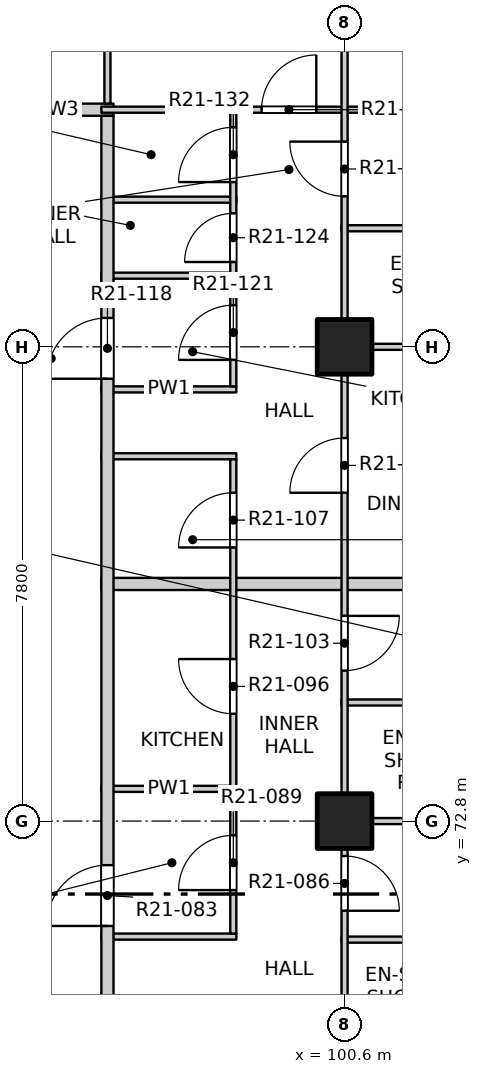
"""IFC4 building model, lengths in metres.
Left out: names, types, materials, properties, quantities, classifications, styles, units other than length and angle.
Written with IfcOpenShell. Run it as: python <this file> out.ifc"""

import sys

from ifc_helpers import new_model, si_unit, direction, frame, frame_2d, origin, origin_2d, place, context, subcontext, project, spatial, rectangle, extrude, element, fill, save


model = new_model("IFC4")
c1 = context("Model", 3, precision=1e-05, world=origin(), true_north=direction((0.0, 1.0)))
c2 = subcontext(c1, "Body", "Model", "MODEL_VIEW")
j1 = project(units=[si_unit("LENGTHUNIT", "METRE"), si_unit("PLANEANGLEUNIT", "RADIAN")], contexts=[c1])
p1 = place(None, origin())
s1 = spatial("IfcSite", under=j1, at=p1, CompositionType="ELEMENT")
p2 = place(p1, origin())
s2 = spatial("IfcBuilding", under=s1, at=p2, CompositionType="ELEMENT")
p3 = place(p2, frame((0.0, 0.0, 221.1)))
s3 = spatial("IfcBuildingStorey", under=s2, at=p3, CompositionType="ELEMENT", Elevation=221.1)
for number, where, z_axis, x_axis in (
    (1, (100.6, 72.8, -0.25), (0.0, 0.0, 1.0), (1.0, 0.0, 0.0)),
    (2, (100.6, 80.6, -0.25), (0.0, 0.0, 1.0), (1.0, 0.0, 0.0)),
):
    element("IfcColumn", number, at=place(p3, frame(where, z_axis=z_axis, x_axis=x_axis)), inside=s3, PredefinedType="COLUMN", context=c2, shape_type="SweptSolid", body=[
        extrude(rectangle(XDim=0.9, YDim=0.9, at=origin_2d()), origin(), (0.0, 0.0, 1.0), 3.4),
    ])
p4 = place(p3, frame((100.55, 70.85, 0.0), z_axis=(0.0, 0.0, 1.0), x_axis=(1.0, 0.0, 0.0)))
e3 = element("IfcWall", 3, at=p4, inside=s3, PredefinedType="PARTITIONING", context=c2, shape_type="SweptSolid", body=[
    extrude(rectangle(XDim=3.4, YDim=0.1, at=frame_2d((1.7, 0.0))), origin(), (0.0, 0.0, 1.0), 3.15),
])
p5 = place(p3, frame((96.6, 70.9, 0.0), z_axis=(0.0, 0.0, 1.0), x_axis=(1.0, 0.0, 0.0)))
e4 = element("IfcWall", 4, at=p5, inside=s3, PredefinedType="PARTITIONING", context=c2, shape_type="SweptSolid", body=[
    extrude(rectangle(XDim=2.22, YDim=0.1, at=frame_2d((1.11, 0.0))), origin(), (0.0, 0.0, 1.0), 3.15),
])
p6 = place(p3, frame((100.55, 72.8, 0.0), z_axis=(0.0, 0.0, 1.0), x_axis=(1.0, 0.0, 0.0)))
e5 = element("IfcWall", 5, at=p6, inside=s3, PredefinedType="PARTITIONING", context=c2, shape_type="SweptSolid", body=[
    extrude(rectangle(XDim=7.55, YDim=0.1, at=frame_2d((3.775, 0.0))), origin(), (0.0, 0.0, 1.0), 3.15),
])
p7 = place(p3, frame((96.6, 73.33, 0.0), z_axis=(0.0, 0.0, 1.0), x_axis=(1.0, 0.0, 0.0)))
e6 = element("IfcWall", 6, at=p7, inside=s3, PredefinedType="PARTITIONING", context=c2, shape_type="SweptSolid", body=[
    extrude(rectangle(XDim=2.22, YDim=0.1, at=frame_2d((1.11, 0.0))), origin(), (0.0, 0.0, 1.0), 3.15),
])
p8 = place(p3, frame((100.55, 74.75, 0.0), z_axis=(0.0, 0.0, 1.0), x_axis=(1.0, 0.0, 0.0)))
e7 = element("IfcWall", 7, at=p8, inside=s3, PredefinedType="PARTITIONING", context=c2, shape_type="SweptSolid", body=[
    extrude(rectangle(XDim=3.4, YDim=0.1, at=frame_2d((1.7, 0.0))), origin(), (0.0, 0.0, 1.0), 3.15),
])
p9 = place(p3, frame((96.6, 76.7, 0.0), z_axis=(0.0, 0.0, 1.0), x_axis=(1.0, 0.0, 0.0)))
e8 = element("IfcWall", 8, at=p9, inside=s3, PredefinedType="PARTITIONING", context=c2, shape_type="SweptSolid", body=[
    extrude(rectangle(XDim=11.5, YDim=0.2, at=frame_2d((5.75, 0.0))), origin(), (0.0, 0.0, 1.0), 2.55),
])
for number, where, z_axis, x_axis in (
    (9, (96.6, 78.8, 0.0), (0.0, 0.0, 1.0), (1.0, 0.0, 0.0)),
    (10, (96.6, 79.9, 0.0), (0.0, 0.0, 1.0), (1.0, 0.0, 0.0)),
):
    element("IfcWall", number, at=place(p3, frame(where, z_axis=z_axis, x_axis=x_axis)), inside=s3, PredefinedType="PARTITIONING", context=c2, shape_type="SweptSolid", body=[
        extrude(rectangle(XDim=2.22, YDim=0.1, at=frame_2d((1.11, 0.0))), origin(), (0.0, 0.0, 1.0), 3.15),
    ])
p10 = place(p3, frame((100.55, 80.6, 0.0), z_axis=(0.0, 0.0, 1.0), x_axis=(1.0, 0.0, 0.0)))
e11 = element("IfcWall", 11, at=p10, inside=s3, PredefinedType="PARTITIONING", context=c2, shape_type="SweptSolid", body=[
    extrude(rectangle(XDim=7.55, YDim=0.1, at=frame_2d((3.775, 0.0))), origin(), (0.0, 0.0, 1.0), 3.15),
])
p11 = place(p3, frame((96.6, 81.77, 0.0), z_axis=(0.0, 0.0, 1.0), x_axis=(1.0, 0.0, 0.0)))
e12 = element("IfcWall", 12, at=p11, inside=s3, PredefinedType="PARTITIONING", context=c2, shape_type="SweptSolid", body=[
    extrude(rectangle(XDim=2.22, YDim=0.1, at=frame_2d((1.11, 0.0))), origin(), (0.0, 0.0, 1.0), 3.15),
])
p12 = place(p3, frame((100.55, 82.55, 0.0), z_axis=(0.0, 0.0, 1.0), x_axis=(1.0, 0.0, 0.0)))
e13 = element("IfcWall", 13, at=p12, inside=s3, PredefinedType="PARTITIONING", context=c2, shape_type="SweptSolid", body=[
    extrude(rectangle(XDim=3.7, YDim=0.1, at=frame_2d((1.85, 0.0))), origin(), (0.0, 0.0, 1.0), 3.15),
])
p13 = place(p3, frame((96.6, 83.02, 0.0), z_axis=(0.0, 0.0, 1.0), x_axis=(1.0, 0.0, 0.0)))
e14 = element("IfcWall", 14, at=p13, inside=s3, PredefinedType="PARTITIONING", context=c2, shape_type="SweptSolid", body=[
    extrude(rectangle(XDim=2.22, YDim=0.1, at=frame_2d((1.11, 0.0))), origin(), (0.0, 0.0, 1.0), 3.15),
])
p14 = place(p3, frame((94.95, 84.5, 0.0), z_axis=(0.0, 0.0, 1.0), x_axis=(1.0, 0.0, 0.0)))
e15 = element("IfcWall", 15, at=p14, inside=s3, PredefinedType="PARTITIONING", context=c2, shape_type="SweptSolid", body=[
    extrude(rectangle(XDim=1.85, YDim=0.2, at=frame_2d((0.925, 0.0))), origin(), (0.0, 0.0, 1.0), 3.15),
])
p15 = place(p3, frame((96.6, 84.5, 0.0), z_axis=(0.0, 0.0, 1.0), x_axis=(1.0, 0.0, 0.0)))
e16 = element("IfcWall", 16, at=p15, inside=s3, PredefinedType="PARTITIONING", context=c2, shape_type="SweptSolid", body=[
    extrude(rectangle(XDim=11.5, YDim=0.1, at=frame_2d((5.75, 0.0))), origin(), (0.0, 0.0, 1.0), 3.15),
])
p16 = place(p15, frame((2.635, 0.0, 0.0)))
e17 = element("IfcOpeningElement", 17, at=p16, cuts=e16, PredefinedType="OPENING", context=c2, shape_type="SweptSolid", body=[
    extrude(rectangle(XDim=0.9, YDim=2.1, at=frame_2d((0.45, 1.05))), frame((0.0, 0.06, 0.0), z_axis=(0.0, -1.0, 0.0), x_axis=(1.0, 0.0, 0.0)), (0.0, 0.0, 1.0), 0.12),
])
p17 = place(p3, frame((96.7, 49.5, 0.0), z_axis=(0.0, 0.0, 1.0), x_axis=(0.0, 1.0, 0.0)))
e18 = element("IfcWall", 18, at=p17, inside=s3, PredefinedType="PARTITIONING", context=c2, shape_type="SweptSolid", body=[
    extrude(rectangle(XDim=34.9, YDim=0.2, at=frame_2d((17.45, 0.0))), origin(), (0.0, 0.0, 1.0), 3.15),
])
p18 = place(p17, frame((3.275, 0.0, 0.0)))
e19 = element("IfcOpeningElement", 19, at=p18, cuts=e18, PredefinedType="OPENING", context=c2, shape_type="SweptSolid", body=[
    extrude(rectangle(XDim=1.0, YDim=2.1, at=frame_2d((0.5, 1.05))), frame((0.0, 0.11, 0.0), z_axis=(0.0, -1.0, 0.0), x_axis=(1.0, 0.0, 0.0)), (0.0, 0.0, 1.0), 0.22),
])
p19 = place(p17, frame((10.825, 0.0, 0.0)))
e20 = element("IfcOpeningElement", 20, at=p19, cuts=e18, PredefinedType="OPENING", context=c2, shape_type="SweptSolid", body=[
    extrude(rectangle(XDim=1.0, YDim=2.1, at=frame_2d((0.5, 1.05))), frame((0.0, 0.11, 0.0), z_axis=(0.0, -1.0, 0.0), x_axis=(1.0, 0.0, 0.0)), (0.0, 0.0, 1.0), 0.22),
])
p20 = place(p17, frame((21.575, 0.0, 0.0)))
e21 = element("IfcOpeningElement", 21, at=p20, cuts=e18, PredefinedType="OPENING", context=c2, shape_type="SweptSolid", body=[
    extrude(rectangle(XDim=1.0, YDim=2.1, at=frame_2d((0.5, 1.05))), frame((0.0, 0.11, 0.0), z_axis=(0.0, -1.0, 0.0), x_axis=(1.0, 0.0, 0.0)), (0.0, 0.0, 1.0), 0.22),
])
p21 = place(p17, frame((30.575, 0.0, 0.0)))
e22 = element("IfcOpeningElement", 22, at=p21, cuts=e18, PredefinedType="OPENING", context=c2, shape_type="SweptSolid", body=[
    extrude(rectangle(XDim=1.0, YDim=2.1, at=frame_2d((0.5, 1.05))), frame((0.0, 0.11, 0.0), z_axis=(0.0, -1.0, 0.0), x_axis=(1.0, 0.0, 0.0)), (0.0, 0.0, 1.0), 0.22),
])
p22 = place(p3, frame((96.7, 84.6, 0.0), z_axis=(0.0, 0.0, 1.0), x_axis=(0.0, 1.0, 0.0)))
e23 = element("IfcWall", 23, at=p22, inside=s3, PredefinedType="PARTITIONING", context=c2, shape_type="SweptSolid", body=[
    extrude(rectangle(XDim=3.5, YDim=0.1, at=frame_2d((1.75, 0.0))), origin(), (0.0, 0.0, 1.0), 3.15),
])
p23 = place(p22, frame((1.4, 0.0, 0.0)))
e24 = element("IfcOpeningElement", 24, at=p23, cuts=e23, PredefinedType="OPENING", context=c2, shape_type="SweptSolid", body=[
    extrude(rectangle(XDim=0.9, YDim=2.1, at=frame_2d((0.45, 1.05))), frame((0.0, 0.06, 0.0), z_axis=(0.0, -1.0, 0.0), x_axis=(1.0, 0.0, 0.0)), (0.0, 0.0, 1.0), 0.12),
])
p24 = place(p3, frame((98.77, 70.95, 0.0), z_axis=(0.0, 0.0, 1.0), x_axis=(0.0, 1.0, 0.0)))
e25 = element("IfcWall", 25, at=p24, inside=s3, PredefinedType="PARTITIONING", context=c2, shape_type="SweptSolid", body=[
    extrude(rectangle(XDim=7.8, YDim=0.1, at=frame_2d((3.9, 0.0))), origin(), (0.0, 0.0, 1.0), 3.15),
])
p25 = place(p24, frame((0.715, 0.0, 0.0)))
e26 = element("IfcOpeningElement", 26, at=p25, cuts=e25, PredefinedType="OPENING", context=c2, shape_type="SweptSolid", body=[
    extrude(rectangle(XDim=0.9, YDim=2.1, at=frame_2d((0.45, 1.05))), frame((0.0, 0.06, 0.0), z_axis=(0.0, -1.0, 0.0), x_axis=(1.0, 0.0, 0.0)), (0.0, 0.0, 1.0), 0.12),
])
p26 = place(p24, frame((3.615, 0.0, 0.0)))
e27 = element("IfcOpeningElement", 27, at=p26, cuts=e25, PredefinedType="OPENING", context=c2, shape_type="SweptSolid", body=[
    extrude(rectangle(XDim=0.9, YDim=2.1, at=frame_2d((0.45, 1.05))), frame((0.0, 0.06, 0.0), z_axis=(0.0, -1.0, 0.0), x_axis=(1.0, 0.0, 0.0)), (0.0, 0.0, 1.0), 0.12),
])
p27 = place(p24, frame((6.35, 0.0, 0.0)))
e28 = element("IfcOpeningElement", 28, at=p27, cuts=e25, PredefinedType="OPENING", context=c2, shape_type="SweptSolid", body=[
    extrude(rectangle(XDim=0.9, YDim=2.1, at=frame_2d((0.45, 1.05))), frame((0.0, 0.06, 0.0), z_axis=(0.0, -1.0, 0.0), x_axis=(1.0, 0.0, 0.0)), (0.0, 0.0, 1.0), 0.12),
])
p28 = place(p3, frame((98.77, 79.95, 0.0), z_axis=(0.0, 0.0, 1.0), x_axis=(0.0, 1.0, 0.0)))
e29 = element("IfcWall", 29, at=p28, inside=s3, PredefinedType="PARTITIONING", context=c2, shape_type="SweptSolid", body=[
    extrude(rectangle(XDim=4.5, YDim=0.1, at=frame_2d((2.25, 0.0))), origin(), (0.0, 0.0, 1.0), 3.15),
])
p29 = place(p28, frame((0.435, 0.0, 0.0)))
e30 = element("IfcOpeningElement", 30, at=p29, cuts=e29, PredefinedType="OPENING", context=c2, shape_type="SweptSolid", body=[
    extrude(rectangle(XDim=0.9, YDim=2.1, at=frame_2d((0.45, 1.05))), frame((0.0, 0.06, 0.0), z_axis=(0.0, -1.0, 0.0), x_axis=(1.0, 0.0, 0.0)), (0.0, 0.0, 1.0), 0.12),
])
p30 = place(p28, frame((2.045, 0.0, 0.0)))
e31 = element("IfcOpeningElement", 31, at=p30, cuts=e29, PredefinedType="OPENING", context=c2, shape_type="SweptSolid", body=[
    extrude(rectangle(XDim=0.8, YDim=2.1, at=frame_2d((0.4, 1.05))), frame((0.0, 0.06, 0.0), z_axis=(0.0, -1.0, 0.0), x_axis=(1.0, 0.0, 0.0)), (0.0, 0.0, 1.0), 0.12),
])
p31 = place(p28, frame((3.36, 0.0, 0.0)))
e32 = element("IfcOpeningElement", 32, at=p31, cuts=e29, PredefinedType="OPENING", context=c2, shape_type="SweptSolid", body=[
    extrude(rectangle(XDim=0.9, YDim=2.1, at=frame_2d((0.45, 1.05))), frame((0.0, 0.06, 0.0), z_axis=(0.0, -1.0, 0.0), x_axis=(1.0, 0.0, 0.0)), (0.0, 0.0, 1.0), 0.12),
])
p32 = place(p3, frame((100.6, 41.9, 0.0), z_axis=(0.0, 0.0, 1.0), x_axis=(0.0, 1.0, 0.0)))
e33 = element("IfcWall", 33, at=p32, inside=s3, PredefinedType="PARTITIONING", context=c2, shape_type="SweptSolid", body=[
    extrude(rectangle(XDim=46.2, YDim=0.1, at=frame_2d((23.1, 0.0))), origin(), (0.0, 0.0, 1.0), 3.15),
])
p33 = place(p32, frame((1.2, 0.0, 0.0)))
e34 = element("IfcOpeningElement", 34, at=p33, cuts=e33, PredefinedType="OPENING", context=c2, shape_type="SweptSolid", body=[
    extrude(rectangle(XDim=0.9, YDim=2.1, at=frame_2d((0.45, 1.05))), frame((0.0, 0.06, 0.0), z_axis=(0.0, -1.0, 0.0), x_axis=(1.0, 0.0, 0.0)), (0.0, 0.0, 1.0), 0.12),
])
p34 = place(p32, frame((6.025, 0.0, 0.0)))
e35 = element("IfcOpeningElement", 35, at=p34, cuts=e33, PredefinedType="OPENING", context=c2, shape_type="SweptSolid", body=[
    extrude(rectangle(XDim=0.9, YDim=2.1, at=frame_2d((0.45, 1.05))), frame((0.0, 0.06, 0.0), z_axis=(0.0, -1.0, 0.0), x_axis=(1.0, 0.0, 0.0)), (0.0, 0.0, 1.0), 0.12),
])
p35 = place(p32, frame((9.0, 0.0, 0.0)))
e36 = element("IfcOpeningElement", 36, at=p35, cuts=e33, PredefinedType="OPENING", context=c2, shape_type="SweptSolid", body=[
    extrude(rectangle(XDim=0.9, YDim=2.1, at=frame_2d((0.45, 1.05))), frame((0.0, 0.06, 0.0), z_axis=(0.0, -1.0, 0.0), x_axis=(1.0, 0.0, 0.0)), (0.0, 0.0, 1.0), 0.12),
])
p36 = place(p32, frame((13.85, 0.0, 0.0)))
e37 = element("IfcOpeningElement", 37, at=p36, cuts=e33, PredefinedType="OPENING", context=c2, shape_type="SweptSolid", body=[
    extrude(rectangle(XDim=0.9, YDim=2.1, at=frame_2d((0.45, 1.05))), frame((0.0, 0.06, 0.0), z_axis=(0.0, -1.0, 0.0), x_axis=(1.0, 0.0, 0.0)), (0.0, 0.0, 1.0), 0.12),
])
p37 = place(p32, frame((16.8, 0.0, 0.0)))
e38 = element("IfcOpeningElement", 38, at=p37, cuts=e33, PredefinedType="OPENING", context=c2, shape_type="SweptSolid", body=[
    extrude(rectangle(XDim=0.9, YDim=2.1, at=frame_2d((0.45, 1.05))), frame((0.0, 0.06, 0.0), z_axis=(0.0, -1.0, 0.0), x_axis=(1.0, 0.0, 0.0)), (0.0, 0.0, 1.0), 0.12),
])
p38 = place(p32, frame((21.625, 0.0, 0.0)))
e39 = element("IfcOpeningElement", 39, at=p38, cuts=e33, PredefinedType="OPENING", context=c2, shape_type="SweptSolid", body=[
    extrude(rectangle(XDim=0.9, YDim=2.1, at=frame_2d((0.45, 1.05))), frame((0.0, 0.06, 0.0), z_axis=(0.0, -1.0, 0.0), x_axis=(1.0, 0.0, 0.0)), (0.0, 0.0, 1.0), 0.12),
])
p39 = place(p32, frame((24.6, 0.0, 0.0)))
e40 = element("IfcOpeningElement", 40, at=p39, cuts=e33, PredefinedType="OPENING", context=c2, shape_type="SweptSolid", body=[
    extrude(rectangle(XDim=0.9, YDim=2.1, at=frame_2d((0.45, 1.05))), frame((0.0, 0.06, 0.0), z_axis=(0.0, -1.0, 0.0), x_axis=(1.0, 0.0, 0.0)), (0.0, 0.0, 1.0), 0.12),
])
p40 = place(p32, frame((29.425, 0.0, 0.0)))
e41 = element("IfcOpeningElement", 41, at=p40, cuts=e33, PredefinedType="OPENING", context=c2, shape_type="SweptSolid", body=[
    extrude(rectangle(XDim=0.9, YDim=2.1, at=frame_2d((0.45, 1.05))), frame((0.0, 0.06, 0.0), z_axis=(0.0, -1.0, 0.0), x_axis=(1.0, 0.0, 0.0)), (0.0, 0.0, 1.0), 0.12),
])
p41 = place(p32, frame((33.375, 0.0, 0.0)))
e42 = element("IfcOpeningElement", 42, at=p41, cuts=e33, PredefinedType="OPENING", context=c2, shape_type="SweptSolid", body=[
    extrude(rectangle(XDim=0.9, YDim=2.1, at=frame_2d((0.45, 1.05))), frame((0.0, 0.06, 0.0), z_axis=(0.0, -1.0, 0.0), x_axis=(1.0, 0.0, 0.0)), (0.0, 0.0, 1.0), 0.12),
])
p42 = place(p32, frame((36.3, 0.0, 0.0)))
e43 = element("IfcOpeningElement", 43, at=p42, cuts=e33, PredefinedType="OPENING", context=c2, shape_type="SweptSolid", body=[
    extrude(rectangle(XDim=0.9, YDim=2.1, at=frame_2d((0.45, 1.05))), frame((0.0, 0.06, 0.0), z_axis=(0.0, -1.0, 0.0), x_axis=(1.0, 0.0, 0.0)), (0.0, 0.0, 1.0), 0.12),
])
p43 = place(p32, frame((41.175, 0.0, 0.0)))
e44 = element("IfcOpeningElement", 44, at=p43, cuts=e33, PredefinedType="OPENING", context=c2, shape_type="SweptSolid", body=[
    extrude(rectangle(XDim=0.9, YDim=2.1, at=frame_2d((0.45, 1.05))), frame((0.0, 0.06, 0.0), z_axis=(0.0, -1.0, 0.0), x_axis=(1.0, 0.0, 0.0)), (0.0, 0.0, 1.0), 0.12),
])
p44 = place(p32, frame((44.1, 0.0, 0.0)))
e45 = element("IfcOpeningElement", 45, at=p44, cuts=e33, PredefinedType="OPENING", context=c2, shape_type="SweptSolid", body=[
    extrude(rectangle(XDim=0.9, YDim=2.1, at=frame_2d((0.45, 1.05))), frame((0.0, 0.06, 0.0), z_axis=(0.0, -1.0, 0.0), x_axis=(1.0, 0.0, 0.0)), (0.0, 0.0, 1.0), 0.12),
])
p45 = place(p20, origin())
e46 = element("IfcDoor", 46, at=p45, inside=s3, OperationType="SINGLE_SWING_LEFT", PredefinedType="DOOR", context=c2, shape_type="SweptSolid", body=[
    extrude(rectangle(XDim=1.0, YDim=2.1, at=frame_2d((0.5, 1.05))), frame((0.0, 0.025, 0.0), z_axis=(0.0, -1.0, 0.0), x_axis=(1.0, 0.0, 0.0)), (0.0, 0.0, 1.0), 0.05),
])
fill(e21, e46)
p46 = place(p40, origin())
e47 = element("IfcDoor", 47, at=p46, inside=s3, OperationType="SINGLE_SWING_RIGHT", PredefinedType="DOOR", context=c2, shape_type="SweptSolid", body=[
    extrude(rectangle(XDim=0.9, YDim=2.1, at=frame_2d((0.45, 1.05))), frame((0.0, 0.025, 0.0), z_axis=(0.0, -1.0, 0.0), x_axis=(1.0, 0.0, 0.0)), (0.0, 0.0, 1.0), 0.05),
])
fill(e41, e47)
p47 = place(p25, origin())
e48 = element("IfcDoor", 48, at=p47, inside=s3, OperationType="SINGLE_SWING_LEFT", PredefinedType="DOOR", context=c2, shape_type="SweptSolid", body=[
    extrude(rectangle(XDim=0.9, YDim=2.1, at=frame_2d((0.45, 1.05))), frame((0.0, 0.025, 0.0), z_axis=(0.0, -1.0, 0.0), x_axis=(1.0, 0.0, 0.0)), (0.0, 0.0, 1.0), 0.05),
])
fill(e26, e48)
p48 = place(p26, origin())
e49 = element("IfcDoor", 49, at=p48, inside=s3, OperationType="SINGLE_SWING_RIGHT", PredefinedType="DOOR", context=c2, shape_type="SweptSolid", body=[
    extrude(rectangle(XDim=0.9, YDim=2.1, at=frame_2d((0.45, 1.05))), frame((0.0, 0.025, 0.0), z_axis=(0.0, -1.0, 0.0), x_axis=(1.0, 0.0, 0.0)), (0.0, 0.0, 1.0), 0.05),
])
fill(e27, e49)
p49 = place(p41, origin())
e50 = element("IfcDoor", 50, at=p49, inside=s3, OperationType="SINGLE_SWING_LEFT", PredefinedType="DOOR", context=c2, shape_type="SweptSolid", body=[
    extrude(rectangle(XDim=0.9, YDim=2.1, at=frame_2d((0.45, 1.05))), frame((0.0, 0.025, 0.0), z_axis=(0.0, -1.0, 0.0), x_axis=(1.0, 0.0, 0.0)), (0.0, 0.0, 1.0), 0.05),
])
fill(e42, e50)
p50 = place(p27, origin())
e51 = element("IfcDoor", 51, at=p50, inside=s3, OperationType="SINGLE_SWING_LEFT", PredefinedType="DOOR", context=c2, shape_type="SweptSolid", body=[
    extrude(rectangle(XDim=0.9, YDim=2.1, at=frame_2d((0.45, 1.05))), frame((0.0, 0.025, 0.0), z_axis=(0.0, -1.0, 0.0), x_axis=(1.0, 0.0, 0.0)), (0.0, 0.0, 1.0), 0.05),
])
fill(e28, e51)
p51 = place(p42, origin())
e52 = element("IfcDoor", 52, at=p51, inside=s3, OperationType="SINGLE_SWING_LEFT", PredefinedType="DOOR", context=c2, shape_type="SweptSolid", body=[
    extrude(rectangle(XDim=0.9, YDim=2.1, at=frame_2d((0.45, 1.05))), frame((0.0, 0.025, 0.0), z_axis=(0.0, -1.0, 0.0), x_axis=(1.0, 0.0, 0.0)), (0.0, 0.0, 1.0), 0.05),
])
fill(e43, e52)
p52 = place(p21, origin())
e53 = element("IfcDoor", 53, at=p52, inside=s3, OperationType="SINGLE_SWING_LEFT", PredefinedType="DOOR", context=c2, shape_type="SweptSolid", body=[
    extrude(rectangle(XDim=1.0, YDim=2.1, at=frame_2d((0.5, 1.05))), frame((0.0, 0.025, 0.0), z_axis=(0.0, -1.0, 0.0), x_axis=(1.0, 0.0, 0.0)), (0.0, 0.0, 1.0), 0.05),
])
fill(e22, e53)
p53 = place(p29, origin())
e54 = element("IfcDoor", 54, at=p53, inside=s3, OperationType="SINGLE_SWING_LEFT", PredefinedType="DOOR", context=c2, shape_type="SweptSolid", body=[
    extrude(rectangle(XDim=0.9, YDim=2.1, at=frame_2d((0.45, 1.05))), frame((0.0, 0.025, 0.0), z_axis=(0.0, -1.0, 0.0), x_axis=(1.0, 0.0, 0.0)), (0.0, 0.0, 1.0), 0.05),
])
fill(e30, e54)
p54 = place(p30, origin())
e55 = element("IfcDoor", 55, at=p54, inside=s3, OperationType="SINGLE_SWING_LEFT", PredefinedType="DOOR", context=c2, shape_type="SweptSolid", body=[
    extrude(rectangle(XDim=0.8, YDim=2.1, at=frame_2d((0.4, 1.05))), frame((0.0, 0.025, 0.0), z_axis=(0.0, -1.0, 0.0), x_axis=(1.0, 0.0, 0.0)), (0.0, 0.0, 1.0), 0.05),
])
fill(e31, e55)
p55 = place(p43, origin())
e56 = element("IfcDoor", 56, at=p55, inside=s3, OperationType="SINGLE_SWING_RIGHT", PredefinedType="DOOR", context=c2, shape_type="SweptSolid", body=[
    extrude(rectangle(XDim=0.9, YDim=2.1, at=frame_2d((0.45, 1.05))), frame((0.0, 0.025, 0.0), z_axis=(0.0, -1.0, 0.0), x_axis=(1.0, 0.0, 0.0)), (0.0, 0.0, 1.0), 0.05),
])
fill(e44, e56)
p56 = place(p31, origin())
e57 = element("IfcDoor", 57, at=p56, inside=s3, OperationType="SINGLE_SWING_LEFT", PredefinedType="DOOR", context=c2, shape_type="SweptSolid", body=[
    extrude(rectangle(XDim=0.9, YDim=2.1, at=frame_2d((0.45, 1.05))), frame((0.0, 0.025, 0.0), z_axis=(0.0, -1.0, 0.0), x_axis=(1.0, 0.0, 0.0)), (0.0, 0.0, 1.0), 0.05),
])
fill(e32, e57)
p57 = place(p16, origin())
e58 = element("IfcDoor", 58, at=p57, inside=s3, OperationType="SINGLE_SWING_RIGHT", PredefinedType="DOOR", context=c2, shape_type="SweptSolid", body=[
    extrude(rectangle(XDim=0.9, YDim=2.1, at=frame_2d((0.45, 1.05))), frame((0.0, 0.025, 0.0), z_axis=(0.0, -1.0, 0.0), x_axis=(1.0, 0.0, 0.0)), (0.0, 0.0, 1.0), 0.05),
])
fill(e17, e58)
save(model, sys.argv[1])
